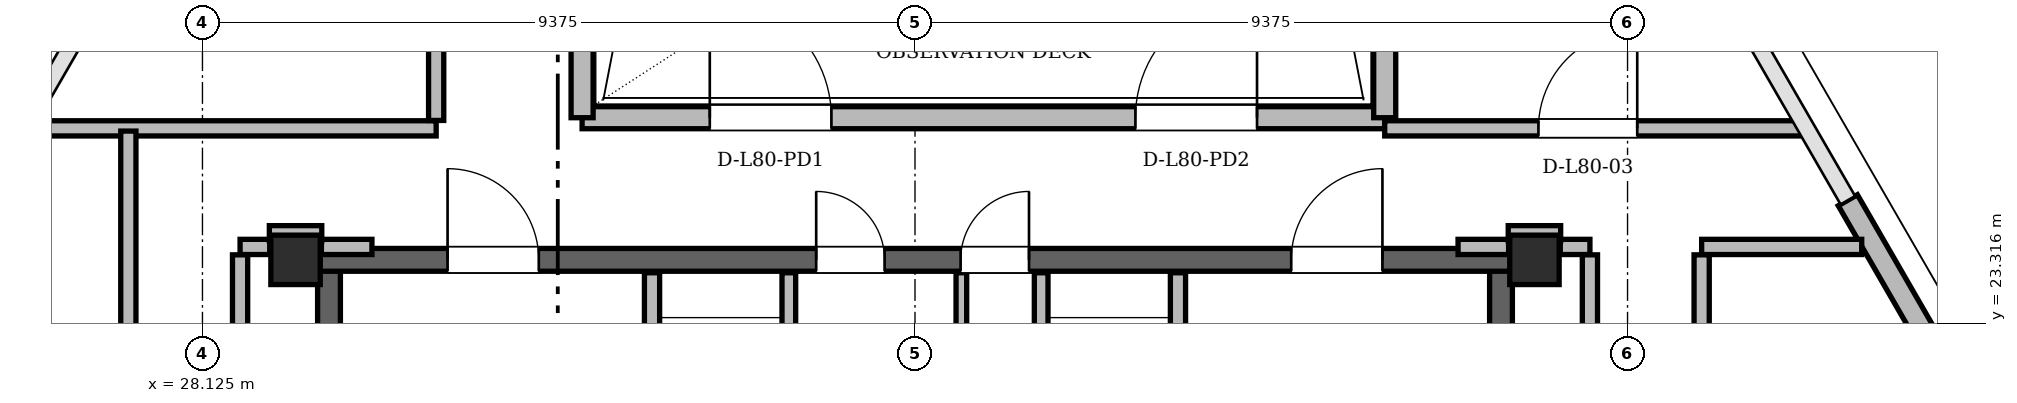
"""IFC4 building model, lengths in metres.
Left out: names, types, materials, properties, quantities, classifications, styles, units other than length and angle.
Written with IfcOpenShell. Run it as: python <this file> out.ifc"""

import sys

from ifc_helpers import new_model, si_unit, direction, frame, frame_2d, origin, origin_2d, place, context, subcontext, project, spatial, rectangle, hollow_rectangle, extrude, element, fill, save


model = new_model("IFC4")
c1 = context("Model", 3, precision=1e-05, world=origin(), true_north=direction((0.0, 1.0)))
c2 = subcontext(c1, "Body", "Model", "MODEL_VIEW")
j1 = project(units=[si_unit("LENGTHUNIT", "METRE"), si_unit("PLANEANGLEUNIT", "RADIAN")], contexts=[c1])
p1 = place(None, origin())
s1 = spatial("IfcSite", under=j1, at=p1, CompositionType="ELEMENT")
p2 = place(p1, origin())
s2 = spatial("IfcBuilding", under=s1, at=p2, CompositionType="ELEMENT")
p3 = place(p2, frame((0.0, 0.0, 305.1)))
s3 = spatial("IfcBuildingStorey", under=s2, at=p3, CompositionType="ELEMENT", Elevation=305.1)
for number, where, z_axis, x_axis in (
    (1, (45.65, 24.15, 0.0), (0.0, 0.0, 1.0), (1.0, 0.0, 0.0)),
    (2, (29.35, 24.15, 0.0), (0.0, 0.0, 1.0), (1.0, 0.0, 0.0)),
):
    element("IfcColumn", number, at=place(p3, frame(where, z_axis=z_axis, x_axis=x_axis)), inside=s3, PredefinedType="COLUMN", context=c2, shape_type="SweptSolid", body=[
        extrude(hollow_rectangle(XDim=0.65, YDim=0.65, WallThickness=0.05, at=origin_2d()), origin(), (0.0, 0.0, 1.0), 4.5),
    ])
for number, where, z_axis, x_axis in (
    (3, (29.79, 11.0, 0.0), (0.0, 0.0, 1.0), (0.0, 1.0, 0.0)),
    (4, (45.21, 11.0, 0.0), (0.0, 0.0, 1.0), (0.0, 1.0, 0.0)),
):
    element("IfcWall", number, at=place(p3, frame(where, z_axis=z_axis, x_axis=x_axis)), inside=s3, PredefinedType="SHEAR", context=c2, shape_type="SweptSolid", body=[
        extrude(rectangle(XDim=13.3, YDim=0.3, at=frame_2d((6.65, 0.0))), origin(), (0.0, 0.0, 1.0), 4.28),
    ])
p4 = place(p3, frame((29.65, 24.15, 0.0), z_axis=(0.0, 0.0, 1.0), x_axis=(1.0, 0.0, 0.0)))
e5 = element("IfcWall", 5, at=p4, inside=s3, PredefinedType="SHEAR", context=c2, shape_type="SweptSolid", body=[
    extrude(rectangle(XDim=15.7, YDim=0.3, at=frame_2d((7.85, 0.0))), origin(), (0.0, 0.0, 1.0), 4.28),
])
p5 = place(p4, frame((1.7, 0.0, 0.0)))
e6 = element("IfcOpeningElement", 6, at=p5, cuts=e5, PredefinedType="OPENING", context=c2, shape_type="SweptSolid", body=[
    extrude(rectangle(XDim=1.2, YDim=2.2, at=frame_2d((0.6, 1.1))), frame((0.0, 0.15, 0.0), z_axis=(0.0, -1.0, 0.0), x_axis=(1.0, 0.0, 0.0)), (0.0, 0.0, 1.0), 0.3),
])
p6 = place(p4, frame((12.8, 0.0, 0.0)))
e7 = element("IfcOpeningElement", 7, at=p6, cuts=e5, PredefinedType="OPENING", context=c2, shape_type="SweptSolid", body=[
    extrude(rectangle(XDim=1.2, YDim=2.2, at=frame_2d((0.6, 1.1))), frame((0.0, 0.15, 0.0), z_axis=(0.0, -1.0, 0.0), x_axis=(1.0, 0.0, 0.0)), (0.0, 0.0, 1.0), 0.3),
])
p7 = place(p4, frame((6.55, 0.0, 0.0)))
e8 = element("IfcOpeningElement", 8, at=p7, cuts=e5, PredefinedType="OPENING", context=c2, shape_type="SweptSolid", body=[
    extrude(rectangle(XDim=0.9, YDim=2.05, at=frame_2d((0.45, 1.025))), frame((0.0, 0.15, 0.0), z_axis=(0.0, -1.0, 0.0), x_axis=(1.0, 0.0, 0.0)), (0.0, 0.0, 1.0), 0.3),
])
p8 = place(p4, frame((8.45, 0.0, 0.0)))
e9 = element("IfcOpeningElement", 9, at=p8, cuts=e5, PredefinedType="OPENING", context=c2, shape_type="SweptSolid", body=[
    extrude(rectangle(XDim=0.9, YDim=2.05, at=frame_2d((0.45, 1.025))), frame((0.0, 0.15, 0.0), z_axis=(0.0, -1.0, 0.0), x_axis=(1.0, 0.0, 0.0)), (0.0, 0.0, 1.0), 0.3),
])
p9 = place(p3, frame((58.224, 10.298, 0.0), z_axis=(0.0, 0.0, 1.0), x_axis=(-0.499998389603, 0.866026333546, 0.0)))
e10 = element("IfcWall", 10, at=p9, inside=s3, PredefinedType="SOLIDWALL", context=c2, shape_type="SweptSolid", body=[
    extrude(rectangle(XDim=16.9, YDim=0.29, at=frame_2d((8.45, 0.0))), origin(), (0.0, 0.0, 1.0), 3.658),
])
p10 = place(p9, frame((3.108, 0.0, 0.85)))
e11 = element("IfcOpeningElement", 11, at=p10, cuts=e10, PredefinedType="OPENING", context=c2, shape_type="SweptSolid", body=[
    extrude(rectangle(XDim=1.2, YDim=1.48, at=frame_2d((0.6, 0.74))), frame((0.0, 0.145, 0.0), z_axis=(0.0, -1.0, 0.0), x_axis=(1.0, 0.0, 0.0)), (0.0, 0.0, 1.0), 0.29),
])
p11 = place(p9, frame((7.739, 0.0, 0.85)))
e12 = element("IfcOpeningElement", 12, at=p11, cuts=e10, PredefinedType="OPENING", context=c2, shape_type="SweptSolid", body=[
    extrude(rectangle(XDim=2.8, YDim=2.05, at=frame_2d((1.4, 1.025))), frame((0.0, 0.145, 0.0), z_axis=(0.0, -1.0, 0.0), x_axis=(1.0, 0.0, 0.0)), (0.0, 0.0, 1.0), 0.29),
])
p12 = place(p3, frame((33.12, 26.02, 0.0), z_axis=(0.0, 0.0, 1.0), x_axis=(1.0, 0.0, 0.0)))
e13 = element("IfcWall", 13, at=p12, inside=s3, PredefinedType="SOLIDWALL", context=c2, shape_type="SweptSolid", body=[
    extrude(rectangle(XDim=10.56, YDim=0.29, at=frame_2d((5.28, 0.0))), origin(), (0.0, 0.0, 1.0), 4.28),
])
p13 = place(p12, frame((1.68, 0.0, 0.0)))
e14 = element("IfcOpeningElement", 14, at=p13, cuts=e13, PredefinedType="OPENING", context=c2, shape_type="SweptSolid", body=[
    extrude(rectangle(XDim=1.6, YDim=2.2, at=frame_2d((0.8, 1.1))), frame((0.0, 0.145, 0.0), z_axis=(0.0, -1.0, 0.0), x_axis=(1.0, 0.0, 0.0)), (0.0, 0.0, 1.0), 0.29),
])
p14 = place(p12, frame((7.28, 0.0, 0.0)))
e15 = element("IfcOpeningElement", 15, at=p14, cuts=e13, PredefinedType="OPENING", context=c2, shape_type="SweptSolid", body=[
    extrude(rectangle(XDim=1.6, YDim=2.2, at=frame_2d((0.8, 1.1))), frame((0.0, 0.145, 0.0), z_axis=(0.0, -1.0, 0.0), x_axis=(1.0, 0.0, 0.0)), (0.0, 0.0, 1.0), 0.29),
])
for number, where, z_axis, x_axis in (
    (16, (33.12, 26.02, 0.0), (0.0, 0.0, 1.0), (0.0, 1.0, 0.0)),
    (17, (43.68, 26.02, 0.0), (0.0, 0.0, 1.0), (0.0, 1.0, 0.0)),
):
    element("IfcWall", number, at=place(p3, frame(where, z_axis=z_axis, x_axis=x_axis)), inside=s3, PredefinedType="SOLIDWALL", context=c2, shape_type="SweptSolid", body=[
        extrude(rectangle(XDim=6.96, YDim=0.29, at=frame_2d((3.48, 0.0))), origin(), (0.0, 0.0, 1.0), 4.28),
    ])
p15 = place(p3, frame((34.04, 19.48, 0.0), z_axis=(0.0, 0.0, 1.0), x_axis=(0.0, 1.0, 0.0)))
e18 = element("IfcWall", 18, at=p15, inside=s3, PredefinedType="PARTITIONING", context=c2, shape_type="SweptSolid", body=[
    extrude(rectangle(XDim=4.5, YDim=0.2, at=frame_2d((2.25, 0.0))), origin(), (0.0, 0.0, 1.0), 4.28),
])
p16 = place(p15, frame((2.12, 0.0, 0.0)))
e19 = element("IfcOpeningElement", 19, at=p16, cuts=e18, PredefinedType="OPENING", context=c2, shape_type="SweptSolid", body=[
    extrude(rectangle(XDim=1.1, YDim=2.2, at=frame_2d((0.55, 1.1))), frame((0.0, 0.1, 0.0), z_axis=(0.0, -1.0, 0.0), x_axis=(1.0, 0.0, 0.0)), (0.0, 0.0, 1.0), 0.2),
])
p17 = place(p3, frame((35.84, 20.96, 0.0), z_axis=(0.0, 0.0, 1.0), x_axis=(0.0, 1.0, 0.0)))
e20 = element("IfcWall", 20, at=p17, inside=s3, PredefinedType="PARTITIONING", context=c2, shape_type="SweptSolid", body=[
    extrude(rectangle(XDim=3.02, YDim=0.18, at=frame_2d((1.51, 0.0))), origin(), (0.0, 0.0, 1.0), 4.28),
])
p18 = place(p3, frame((40.96, 19.48, 0.0), z_axis=(0.0, 0.0, 1.0), x_axis=(0.0, 1.0, 0.0)))
e21 = element("IfcWall", 21, at=p18, inside=s3, PredefinedType="PARTITIONING", context=c2, shape_type="SweptSolid", body=[
    extrude(rectangle(XDim=4.5, YDim=0.2, at=frame_2d((2.25, 0.0))), origin(), (0.0, 0.0, 1.0), 4.28),
])
p19 = place(p18, frame((2.12, 0.0, 0.0)))
e22 = element("IfcOpeningElement", 22, at=p19, cuts=e21, PredefinedType="OPENING", context=c2, shape_type="SweptSolid", body=[
    extrude(rectangle(XDim=1.1, YDim=2.2, at=frame_2d((0.55, 1.1))), frame((0.0, 0.1, 0.0), z_axis=(0.0, -1.0, 0.0), x_axis=(1.0, 0.0, 0.0)), (0.0, 0.0, 1.0), 0.2),
])
p20 = place(p3, frame((39.16, 20.96, 0.0), z_axis=(0.0, 0.0, 1.0), x_axis=(0.0, 1.0, 0.0)))
e23 = element("IfcWall", 23, at=p20, inside=s3, PredefinedType="PARTITIONING", context=c2, shape_type="SweptSolid", body=[
    extrude(rectangle(XDim=3.02, YDim=0.18, at=frame_2d((1.51, 0.0))), origin(), (0.0, 0.0, 1.0), 4.28),
])
p21 = place(p3, frame((38.11, 21.06, 0.0), z_axis=(0.0, 0.0, 1.0), x_axis=(0.0, 1.0, 0.0)))
e24 = element("IfcWall", 24, at=p21, inside=s3, PredefinedType="PARTITIONING", context=c2, shape_type="SweptSolid", body=[
    extrude(rectangle(XDim=2.92, YDim=0.14, at=frame_2d((1.46, 0.0))), origin(), (0.0, 0.0, 1.0), 4.28),
])
p22 = place(p3, frame((28.62, 24.32, 0.0), z_axis=(0.0, 0.0, 1.0), x_axis=(1.0, 0.0, 0.0)))
e25 = element("IfcWall", 25, at=p22, inside=s3, PredefinedType="PARTITIONING", context=c2, shape_type="SweptSolid", body=[
    extrude(rectangle(XDim=0.39, YDim=0.2, at=frame_2d((0.195, 0.0))), origin(), (0.0, 0.0, 1.0), 4.28),
])
for number, where, z_axis, x_axis in (
    (26, (29.69, 24.32, 0.0), (0.0, 0.0, 1.0), (1.0, 0.0, 0.0)),
    (27, (44.645, 24.32, 0.0), (0.0, 0.0, 1.0), (1.0, 0.0, 0.0)),
):
    element("IfcWall", number, at=place(p3, frame(where, z_axis=z_axis, x_axis=x_axis)), inside=s3, PredefinedType="PARTITIONING", context=c2, shape_type="SweptSolid", body=[
        extrude(rectangle(XDim=0.665, YDim=0.2, at=frame_2d((0.333, 0.0))), origin(), (0.0, 0.0, 1.0), 3.42),
    ])
p23 = place(p3, frame((45.99, 24.32, 0.0), z_axis=(0.0, 0.0, 1.0), x_axis=(1.0, 0.0, 0.0)))
e28 = element("IfcWall", 28, at=p23, inside=s3, PredefinedType="PARTITIONING", context=c2, shape_type="SweptSolid", body=[
    extrude(rectangle(XDim=0.39, YDim=0.2, at=frame_2d((0.195, 0.0))), origin(), (0.0, 0.0, 1.0), 4.28),
])
p24 = place(p3, frame((47.85, 24.32, 0.0), z_axis=(0.0, 0.0, 1.0), x_axis=(1.0, 0.0, 0.0)))
e29 = element("IfcWall", 29, at=p24, inside=s3, PredefinedType="PARTITIONING", context=c2, shape_type="SweptSolid", body=[
    extrude(rectangle(XDim=2.106, YDim=0.2, at=frame_2d((1.053, 0.0))), origin(), (0.0, 0.0, 1.0), 4.28),
])
for number, where, z_axis, x_axis in (
    (30, (29.005, 24.5, 0.0), (0.0, 0.0, 1.0), (1.0, 0.0, 0.0)),
    (31, (45.305, 24.5, 0.0), (0.0, 0.0, 1.0), (1.0, 0.0, 0.0)),
):
    element("IfcWall", number, at=place(p3, frame(where, z_axis=z_axis, x_axis=x_axis)), inside=s3, PredefinedType="PARTITIONING", context=c2, shape_type="SweptSolid", body=[
        extrude(rectangle(XDim=0.69, YDim=0.2, at=frame_2d((0.345, 0.0))), origin(), (0.0, 0.0, 1.0), 4.28),
    ])
p25 = place(p3, frame((25.836, 25.88, 0.0), z_axis=(0.0, 0.0, 1.0), x_axis=(1.0, 0.0, 0.0)))
e32 = element("IfcWall", 32, at=p25, inside=s3, PredefinedType="PARTITIONING", context=c2, shape_type="SweptSolid", body=[
    extrude(rectangle(XDim=5.364, YDim=0.2, at=frame_2d((2.682, 0.0))), origin(), (0.0, 0.0, 1.0), 3.658),
])
p26 = place(p3, frame((43.68, 25.88, 0.0), z_axis=(0.0, 0.0, 1.0), x_axis=(1.0, 0.0, 0.0)))
e33 = element("IfcWall", 33, at=p26, inside=s3, PredefinedType="PARTITIONING", context=c2, shape_type="SweptSolid", body=[
    extrude(rectangle(XDim=5.484, YDim=0.2, at=frame_2d((2.742, 0.0))), origin(), (0.0, 0.0, 1.0), 3.658),
])
p27 = place(p26, frame((2.022, 0.0, 0.0)))
e34 = element("IfcOpeningElement", 34, at=p27, cuts=e33, PredefinedType="OPENING", context=c2, shape_type="SweptSolid", body=[
    extrude(rectangle(XDim=1.3, YDim=2.2, at=frame_2d((0.65, 1.1))), frame((0.0, 0.1, 0.0), z_axis=(0.0, -1.0, 0.0), x_axis=(1.0, 0.0, 0.0)), (0.0, 0.0, 1.0), 0.2),
])
p28 = place(p3, frame((27.15, 9.404, 0.0), z_axis=(0.0, 0.0, 1.0), x_axis=(0.0, 1.0, 0.0)))
e35 = element("IfcWall", 35, at=p28, inside=s3, PredefinedType="PARTITIONING", context=c2, shape_type="SweptSolid", body=[
    extrude(rectangle(XDim=16.44, YDim=0.2, at=frame_2d((8.22, 0.0))), origin(), (0.0, 0.0, 1.0), 3.866),
])
p29 = place(p28, frame((4.047, 0.0, 0.0)))
e36 = element("IfcOpeningElement", 36, at=p29, cuts=e35, PredefinedType="OPENING", context=c2, shape_type="SweptSolid", body=[
    extrude(rectangle(XDim=1.3, YDim=2.2, at=frame_2d((0.65, 1.1))), frame((0.0, 0.1, 0.0), z_axis=(0.0, -1.0, 0.0), x_axis=(1.0, 0.0, 0.0)), (0.0, 0.0, 1.0), 0.2),
])
p30 = place(p28, frame((10.68, 0.0, 0.0)))
e37 = element("IfcOpeningElement", 37, at=p30, cuts=e35, PredefinedType="OPENING", context=c2, shape_type="SweptSolid", body=[
    extrude(rectangle(XDim=1.3, YDim=2.2, at=frame_2d((0.65, 1.1))), frame((0.0, 0.1, 0.0), z_axis=(0.0, -1.0, 0.0), x_axis=(1.0, 0.0, 0.0)), (0.0, 0.0, 1.0), 0.2),
])
p31 = place(p3, frame((28.62, 11.054, 0.0), z_axis=(0.0, 0.0, 1.0), x_axis=(0.0, 1.0, 0.0)))
e38 = element("IfcWall", 38, at=p31, inside=s3, PredefinedType="PARTITIONING", context=c2, shape_type="SweptSolid", body=[
    extrude(rectangle(XDim=13.162, YDim=0.2, at=frame_2d((6.581, 0.0))), origin(), (0.0, 0.0, 1.0), 4.28),
])
p32 = place(p3, frame((31.2, 25.984, 0.0), z_axis=(0.0, 0.0, 1.0), x_axis=(0.0, 1.0, 0.0)))
e39 = element("IfcWall", 39, at=p32, inside=s3, PredefinedType="PARTITIONING", context=c2, shape_type="SweptSolid", body=[
    extrude(rectangle(XDim=8.712, YDim=0.2, at=frame_2d((4.356, 0.0))), origin(), (0.0, 0.0, 1.0), 4.28),
])
p33 = place(p32, frame((3.731, 0.0, 0.0)))
e40 = element("IfcOpeningElement", 40, at=p33, cuts=e39, PredefinedType="OPENING", context=c2, shape_type="SweptSolid", body=[
    extrude(rectangle(XDim=1.3, YDim=2.2, at=frame_2d((0.65, 1.1))), frame((0.0, 0.1, 0.0), z_axis=(0.0, -1.0, 0.0), x_axis=(1.0, 0.0, 0.0)), (0.0, 0.0, 1.0), 0.2),
])
p34 = place(p3, frame((46.38, 11.054, 0.0), z_axis=(0.0, 0.0, 1.0), x_axis=(0.0, 1.0, 0.0)))
e41 = element("IfcWall", 41, at=p34, inside=s3, PredefinedType="PARTITIONING", context=c2, shape_type="SweptSolid", body=[
    extrude(rectangle(XDim=13.162, YDim=0.2, at=frame_2d((6.581, 0.0))), origin(), (0.0, 0.0, 1.0), 4.28),
])
p35 = place(p3, frame((47.85, 19.268, 0.0), z_axis=(0.0, 0.0, 1.0), x_axis=(0.0, 1.0, 0.0)))
e42 = element("IfcWall", 42, at=p35, inside=s3, PredefinedType="PARTITIONING", context=c2, shape_type="SweptSolid", body=[
    extrude(rectangle(XDim=4.948, YDim=0.2, at=frame_2d((2.474, 0.0))), origin(), (0.0, 0.0, 1.0), 4.28),
])
p36 = place(p35, frame((0.5, 0.0, 0.0)))
e43 = element("IfcOpeningElement", 43, at=p36, cuts=e42, PredefinedType="OPENING", context=c2, shape_type="SweptSolid", body=[
    extrude(rectangle(XDim=0.88, YDim=2.08, at=frame_2d((0.44, 1.04))), frame((0.0, 0.1, 0.0), z_axis=(0.0, -1.0, 0.0), x_axis=(1.0, 0.0, 0.0)), (0.0, 0.0, 1.0), 0.2),
])
p37 = place(p35, frame((2.803, 0.0, 0.0)))
e44 = element("IfcOpeningElement", 44, at=p37, cuts=e42, PredefinedType="OPENING", context=c2, shape_type="SweptSolid", body=[
    extrude(rectangle(XDim=0.88, YDim=2.08, at=frame_2d((0.44, 1.04))), frame((0.0, 0.1, 0.0), z_axis=(0.0, -1.0, 0.0), x_axis=(1.0, 0.0, 0.0)), (0.0, 0.0, 1.0), 0.2),
])
p38 = place(p13, origin())
e45 = element("IfcDoor", 45, at=p38, inside=s3, OperationType="SINGLE_SWING_LEFT", PredefinedType="DOOR", context=c2, shape_type="SweptSolid", body=[
    extrude(rectangle(XDim=1.6, YDim=2.2, at=frame_2d((0.8, 1.1))), frame((0.0, 0.025, 0.0), z_axis=(0.0, -1.0, 0.0), x_axis=(1.0, 0.0, 0.0)), (0.0, 0.0, 1.0), 0.05),
])
fill(e14, e45)
p39 = place(p14, origin())
e46 = element("IfcDoor", 46, at=p39, inside=s3, OperationType="SINGLE_SWING_RIGHT", PredefinedType="DOOR", context=c2, shape_type="SweptSolid", body=[
    extrude(rectangle(XDim=1.6, YDim=2.2, at=frame_2d((0.8, 1.1))), frame((0.0, 0.025, 0.0), z_axis=(0.0, -1.0, 0.0), x_axis=(1.0, 0.0, 0.0)), (0.0, 0.0, 1.0), 0.05),
])
fill(e15, e46)
p40 = place(p5, origin())
e47 = element("IfcDoor", 47, at=p40, inside=s3, OperationType="SINGLE_SWING_LEFT", PredefinedType="DOOR", context=c2, shape_type="SweptSolid", body=[
    extrude(rectangle(XDim=1.2, YDim=2.2, at=frame_2d((0.6, 1.1))), frame((0.0, 0.025, 0.0), z_axis=(0.0, -1.0, 0.0), x_axis=(1.0, 0.0, 0.0)), (0.0, 0.0, 1.0), 0.05),
])
fill(e6, e47)
p41 = place(p6, origin())
e48 = element("IfcDoor", 48, at=p41, inside=s3, OperationType="SINGLE_SWING_RIGHT", PredefinedType="DOOR", context=c2, shape_type="SweptSolid", body=[
    extrude(rectangle(XDim=1.2, YDim=2.2, at=frame_2d((0.6, 1.1))), frame((0.0, 0.025, 0.0), z_axis=(0.0, -1.0, 0.0), x_axis=(1.0, 0.0, 0.0)), (0.0, 0.0, 1.0), 0.05),
])
fill(e7, e48)
p42 = place(p7, origin())
e49 = element("IfcDoor", 49, at=p42, inside=s3, OperationType="SINGLE_SWING_LEFT", PredefinedType="DOOR", context=c2, shape_type="SweptSolid", body=[
    extrude(rectangle(XDim=0.9, YDim=2.05, at=frame_2d((0.45, 1.025))), frame((0.0, 0.025, 0.0), z_axis=(0.0, -1.0, 0.0), x_axis=(1.0, 0.0, 0.0)), (0.0, 0.0, 1.0), 0.05),
])
fill(e8, e49)
p43 = place(p8, origin())
e50 = element("IfcDoor", 50, at=p43, inside=s3, OperationType="SINGLE_SWING_RIGHT", PredefinedType="DOOR", context=c2, shape_type="SweptSolid", body=[
    extrude(rectangle(XDim=0.9, YDim=2.05, at=frame_2d((0.45, 1.025))), frame((0.0, 0.025, 0.0), z_axis=(0.0, -1.0, 0.0), x_axis=(1.0, 0.0, 0.0)), (0.0, 0.0, 1.0), 0.05),
])
fill(e9, e50)
p44 = place(p27, origin())
e51 = element("IfcDoor", 51, at=p44, inside=s3, OperationType="SINGLE_SWING_RIGHT", PredefinedType="DOOR", context=c2, shape_type="SweptSolid", body=[
    extrude(rectangle(XDim=1.3, YDim=2.2, at=frame_2d((0.65, 1.1))), frame((0.0, 0.025, 0.0), z_axis=(0.0, -1.0, 0.0), x_axis=(1.0, 0.0, 0.0)), (0.0, 0.0, 1.0), 0.05),
])
fill(e34, e51)
save(model, sys.argv[1])
